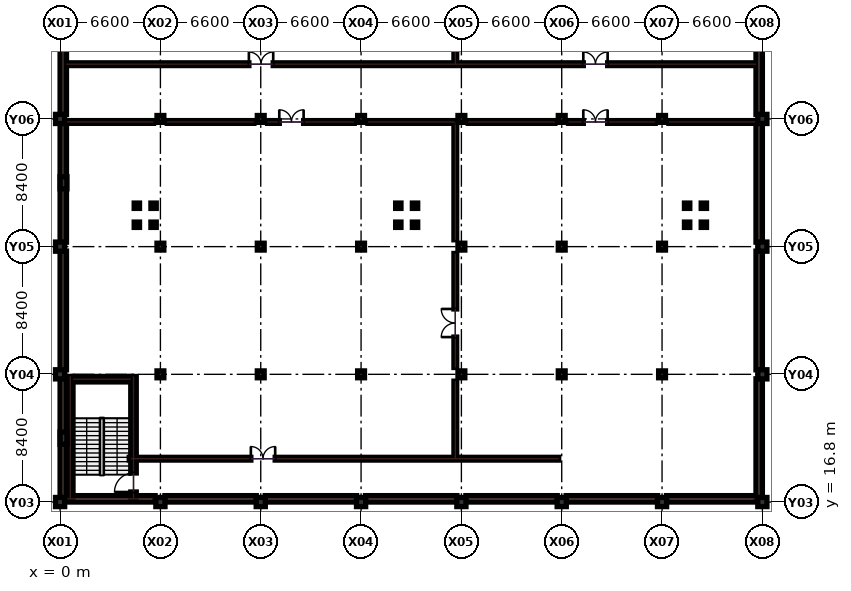
"""IFC4 building model, lengths in metres.
Left out: names, types, materials, properties, quantities, classifications, styles, units other than length and angle.
Written with IfcOpenShell. Run it as: python <this file> out.ifc"""

import sys

from ifc_helpers import new_model, si_unit, direction, frame, frame_2d, origin, origin_2d, place, context, subcontext, project, spatial, rectangle, extrude, element, fill, save


model = new_model("IFC4")
c1 = context("Model", 3, precision=1e-05, world=origin(), true_north=direction((0.0, 1.0)))
c2 = subcontext(c1, "Body", "Model", "MODEL_VIEW")
j1 = project(units=[si_unit("LENGTHUNIT", "METRE"), si_unit("PLANEANGLEUNIT", "RADIAN")], contexts=[c1])
p1 = place(None, origin())
s1 = spatial("IfcSite", under=j1, at=p1, CompositionType="ELEMENT")
p2 = place(p1, origin())
s2 = spatial("IfcBuilding", under=s1, at=p2, CompositionType="ELEMENT")
p3 = place(p2, frame((0.0, 0.0, -4.5)))
s3 = spatial("IfcBuildingStorey", under=s2, at=p3, CompositionType="ELEMENT", Elevation=-4.5)
for number, where, z_axis, x_axis in (
    (1, (0.0, 16.8, 0.0), (0.0, 0.0, 1.0), (1.0, 0.0, 0.0)),
    (2, (0.0, 25.2, 0.0), (0.0, 0.0, 1.0), (1.0, 0.0, 0.0)),
    (3, (0.0, 33.6, 0.0), (0.0, 0.0, 1.0), (1.0, 0.0, 0.0)),
    (4, (0.0, 42.0, 0.0), (0.0, 0.0, 1.0), (1.0, 0.0, 0.0)),
    (5, (6.6, 16.8, 0.0), (0.0, 0.0, 1.0), (1.0, 0.0, 0.0)),
):
    element("IfcColumn", number, at=place(p3, frame(where, z_axis=z_axis, x_axis=x_axis)), inside=s3, PredefinedType="COLUMN", context=c2, shape_type="SweptSolid", body=[
        extrude(rectangle(XDim=0.6, YDim=0.6, at=origin_2d()), origin(), (0.0, 0.0, 1.0), 4.5),
    ])
for number, where, z_axis, x_axis in (
    (6, (6.6, 25.2, 0.0), (0.0, 0.0, 1.0), (1.0, 0.0, 0.0)),
    (7, (6.6, 33.6, 0.0), (0.0, 0.0, 1.0), (1.0, 0.0, 0.0)),
    (8, (6.6, 42.0, 0.0), (0.0, 0.0, 1.0), (1.0, 0.0, 0.0)),
):
    element("IfcColumn", number, at=place(p3, frame(where, z_axis=z_axis, x_axis=x_axis)), inside=s3, PredefinedType="COLUMN", context=c2, shape_type="SweptSolid", body=[
        extrude(rectangle(XDim=0.45, YDim=0.45, at=origin_2d()), origin(), (0.0, 0.0, 1.0), 4.5),
    ])
p4 = place(p3, frame((13.2, 16.8, 0.0), z_axis=(0.0, 0.0, 1.0), x_axis=(1.0, 0.0, 0.0)))
e9 = element("IfcColumn", 9, at=p4, inside=s3, PredefinedType="COLUMN", context=c2, shape_type="SweptSolid", body=[
    extrude(rectangle(XDim=0.6, YDim=0.6, at=origin_2d()), origin(), (0.0, 0.0, 1.0), 4.5),
])
for number, where, z_axis, x_axis in (
    (10, (13.2, 25.2, 0.0), (0.0, 0.0, 1.0), (1.0, 0.0, 0.0)),
    (11, (13.2, 33.6, 0.0), (0.0, 0.0, 1.0), (1.0, 0.0, 0.0)),
    (12, (13.2, 42.0, 0.0), (0.0, 0.0, 1.0), (1.0, 0.0, 0.0)),
):
    element("IfcColumn", number, at=place(p3, frame(where, z_axis=z_axis, x_axis=x_axis)), inside=s3, PredefinedType="COLUMN", context=c2, shape_type="SweptSolid", body=[
        extrude(rectangle(XDim=0.45, YDim=0.45, at=origin_2d()), origin(), (0.0, 0.0, 1.0), 4.5),
    ])
p5 = place(p3, frame((19.8, 16.8, 0.0), z_axis=(0.0, 0.0, 1.0), x_axis=(1.0, 0.0, 0.0)))
e13 = element("IfcColumn", 13, at=p5, inside=s3, PredefinedType="COLUMN", context=c2, shape_type="SweptSolid", body=[
    extrude(rectangle(XDim=0.6, YDim=0.6, at=origin_2d()), origin(), (0.0, 0.0, 1.0), 4.5),
])
for number, where, z_axis, x_axis in (
    (14, (19.8, 25.2, 0.0), (0.0, 0.0, 1.0), (1.0, 0.0, 0.0)),
    (15, (19.8, 33.6, 0.0), (0.0, 0.0, 1.0), (1.0, 0.0, 0.0)),
    (16, (19.8, 42.0, 0.0), (0.0, 0.0, 1.0), (1.0, 0.0, 0.0)),
):
    element("IfcColumn", number, at=place(p3, frame(where, z_axis=z_axis, x_axis=x_axis)), inside=s3, PredefinedType="COLUMN", context=c2, shape_type="SweptSolid", body=[
        extrude(rectangle(XDim=0.45, YDim=0.45, at=origin_2d()), origin(), (0.0, 0.0, 1.0), 4.5),
    ])
p6 = place(p3, frame((26.4, 16.8, 0.0), z_axis=(0.0, 0.0, 1.0), x_axis=(1.0, 0.0, 0.0)))
e17 = element("IfcColumn", 17, at=p6, inside=s3, PredefinedType="COLUMN", context=c2, shape_type="SweptSolid", body=[
    extrude(rectangle(XDim=0.6, YDim=0.6, at=origin_2d()), origin(), (0.0, 0.0, 1.0), 4.5),
])
for number, where, z_axis, x_axis in (
    (18, (26.4, 25.2, 0.0), (0.0, 0.0, 1.0), (1.0, 0.0, 0.0)),
    (19, (26.4, 33.6, 0.0), (0.0, 0.0, 1.0), (1.0, 0.0, 0.0)),
    (20, (26.4, 42.0, 0.0), (0.0, 0.0, 1.0), (1.0, 0.0, 0.0)),
):
    element("IfcColumn", number, at=place(p3, frame(where, z_axis=z_axis, x_axis=x_axis)), inside=s3, PredefinedType="COLUMN", context=c2, shape_type="SweptSolid", body=[
        extrude(rectangle(XDim=0.45, YDim=0.45, at=origin_2d()), origin(), (0.0, 0.0, 1.0), 4.5),
    ])
p7 = place(p3, frame((33.0, 16.8, 0.0), z_axis=(0.0, 0.0, 1.0), x_axis=(1.0, 0.0, 0.0)))
e21 = element("IfcColumn", 21, at=p7, inside=s3, PredefinedType="COLUMN", context=c2, shape_type="SweptSolid", body=[
    extrude(rectangle(XDim=0.6, YDim=0.6, at=origin_2d()), origin(), (0.0, 0.0, 1.0), 4.5),
])
for number, where, z_axis, x_axis in (
    (22, (33.0, 25.2, 0.0), (0.0, 0.0, 1.0), (1.0, 0.0, 0.0)),
    (23, (33.0, 33.6, 0.0), (0.0, 0.0, 1.0), (1.0, 0.0, 0.0)),
    (24, (33.0, 42.0, 0.0), (0.0, 0.0, 1.0), (1.0, 0.0, 0.0)),
):
    element("IfcColumn", number, at=place(p3, frame(where, z_axis=z_axis, x_axis=x_axis)), inside=s3, PredefinedType="COLUMN", context=c2, shape_type="SweptSolid", body=[
        extrude(rectangle(XDim=0.45, YDim=0.45, at=origin_2d()), origin(), (0.0, 0.0, 1.0), 4.5),
    ])
p8 = place(p3, frame((39.6, 16.8, 0.0), z_axis=(0.0, 0.0, 1.0), x_axis=(1.0, 0.0, 0.0)))
e25 = element("IfcColumn", 25, at=p8, inside=s3, PredefinedType="COLUMN", context=c2, shape_type="SweptSolid", body=[
    extrude(rectangle(XDim=0.6, YDim=0.6, at=origin_2d()), origin(), (0.0, 0.0, 1.0), 4.5),
])
for number, where, z_axis, x_axis in (
    (26, (39.6, 25.2, 0.0), (0.0, 0.0, 1.0), (1.0, 0.0, 0.0)),
    (27, (39.6, 33.6, 0.0), (0.0, 0.0, 1.0), (1.0, 0.0, 0.0)),
    (28, (39.6, 42.0, 0.0), (0.0, 0.0, 1.0), (1.0, 0.0, 0.0)),
):
    element("IfcColumn", number, at=place(p3, frame(where, z_axis=z_axis, x_axis=x_axis)), inside=s3, PredefinedType="COLUMN", context=c2, shape_type="SweptSolid", body=[
        extrude(rectangle(XDim=0.45, YDim=0.45, at=origin_2d()), origin(), (0.0, 0.0, 1.0), 4.5),
    ])
for number, where, z_axis, x_axis in (
    (29, (46.2, 16.8, 0.0), (0.0, 0.0, 1.0), (1.0, 0.0, 0.0)),
    (30, (46.2, 25.2, 0.0), (0.0, 0.0, 1.0), (1.0, 0.0, 0.0)),
    (31, (46.2, 33.6, 0.0), (0.0, 0.0, 1.0), (1.0, 0.0, 0.0)),
    (32, (46.2, 42.0, 0.0), (0.0, 0.0, 1.0), (1.0, 0.0, 0.0)),
):
    element("IfcColumn", number, at=place(p3, frame(where, z_axis=z_axis, x_axis=x_axis)), inside=s3, PredefinedType="COLUMN", context=c2, shape_type="SweptSolid", body=[
        extrude(rectangle(XDim=0.6, YDim=0.6, at=origin_2d()), origin(), (0.0, 0.0, 1.0), 4.5),
    ])
for number, where, z_axis, x_axis in (
    (33, (0.225, 21.0, 0.0), (0.0, 0.0, 1.0), (1.0, 0.0, 0.0)),
    (34, (0.225, 37.8, 0.0), (0.0, 0.0, 1.0), (1.0, 0.0, 0.0)),
):
    element("IfcColumn", number, at=place(p3, frame(where, z_axis=z_axis, x_axis=x_axis)), inside=s3, PredefinedType="PILASTER", context=c2, shape_type="SweptSolid", body=[
        extrude(rectangle(XDim=0.45, YDim=0.8, at=origin_2d()), origin(), (0.0, 0.0, 1.0), 4.5),
    ])
p9 = place(p3, frame((4.55, 19.65, 0.0), z_axis=(0.0, 0.0, 1.0), x_axis=(1.0, 0.0, 0.0)))
e35 = element("IfcWall", 35, at=p9, inside=s3, PredefinedType="SOLIDWALL", context=c2, shape_type="SweptSolid", body=[
    extrude(rectangle(XDim=28.25, YDim=0.18, at=frame_2d((14.125, 0.0))), origin(), (0.0, 0.0, 1.0), 3.29),
])
p10 = place(p9, frame((8.0, 0.0, 0.0)))
e36 = element("IfcOpeningElement", 36, at=p10, cuts=e35, PredefinedType="OPENING", context=c2, shape_type="SweptSolid", body=[
    extrude(rectangle(XDim=1.6, YDim=2.2, at=frame_2d((0.8, 1.1))), frame((0.0, 0.1, 0.0), z_axis=(0.0, -1.0, 0.0), x_axis=(1.0, 0.0, 0.0)), (0.0, 0.0, 1.0), 0.2),
])
p11 = place(p3, frame((0.42, 41.8, 0.0), z_axis=(0.0, 0.0, 1.0), x_axis=(1.0, 0.0, 0.0)))
e37 = element("IfcWall", 37, at=p11, inside=s3, PredefinedType="SOLIDWALL", context=c2, shape_type="SweptSolid", body=[
    extrude(rectangle(XDim=5.73, YDim=0.18, at=frame_2d((2.865, 0.0))), origin(), (0.0, 0.0, 1.0), 3.275),
])
p12 = place(p3, frame((7.05, 41.8, 0.0), z_axis=(0.0, 0.0, 1.0), x_axis=(1.0, 0.0, 0.0)))
e38 = element("IfcWall", 38, at=p12, inside=s3, PredefinedType="SOLIDWALL", context=c2, shape_type="SweptSolid", body=[
    extrude(rectangle(XDim=5.7, YDim=0.18, at=frame_2d((2.85, 0.0))), origin(), (0.0, 0.0, 1.0), 3.275),
])
p13 = place(p3, frame((13.65, 41.8, 0.0), z_axis=(0.0, 0.0, 1.0), x_axis=(1.0, 0.0, 0.0)))
e39 = element("IfcWall", 39, at=p13, inside=s3, PredefinedType="SOLIDWALL", context=c2, shape_type="SweptSolid", body=[
    extrude(rectangle(XDim=5.7, YDim=0.18, at=frame_2d((2.85, 0.0))), origin(), (0.0, 0.0, 1.0), 3.275),
])
p14 = place(p13, frame((0.77, 0.0, 0.0)))
e40 = element("IfcOpeningElement", 40, at=p14, cuts=e39, PredefinedType="OPENING", context=c2, shape_type="SweptSolid", body=[
    extrude(rectangle(XDim=1.6, YDim=2.2, at=frame_2d((0.8, 1.1))), frame((0.0, 0.1, 0.0), z_axis=(0.0, -1.0, 0.0), x_axis=(1.0, 0.0, 0.0)), (0.0, 0.0, 1.0), 0.2),
])
for number, where, z_axis, x_axis in (
    (41, (20.25, 41.8, 0.0), (0.0, 0.0, 1.0), (1.0, 0.0, 0.0)),
    (42, (26.85, 41.8, 0.0), (0.0, 0.0, 1.0), (1.0, 0.0, 0.0)),
):
    element("IfcWall", number, at=place(p3, frame(where, z_axis=z_axis, x_axis=x_axis)), inside=s3, PredefinedType="SOLIDWALL", context=c2, shape_type="SweptSolid", body=[
        extrude(rectangle(XDim=5.7, YDim=0.18, at=frame_2d((2.85, 0.0))), origin(), (0.0, 0.0, 1.0), 3.275),
    ])
p15 = place(p3, frame((33.45, 41.8, 0.0), z_axis=(0.0, 0.0, 1.0), x_axis=(1.0, 0.0, 0.0)))
e43 = element("IfcWall", 43, at=p15, inside=s3, PredefinedType="SOLIDWALL", context=c2, shape_type="SweptSolid", body=[
    extrude(rectangle(XDim=5.7, YDim=0.18, at=frame_2d((2.85, 0.0))), origin(), (0.0, 0.0, 1.0), 3.275),
])
p16 = place(p15, frame((0.97, 0.0, 0.0)))
e44 = element("IfcOpeningElement", 44, at=p16, cuts=e43, PredefinedType="OPENING", context=c2, shape_type="SweptSolid", body=[
    extrude(rectangle(XDim=1.6, YDim=2.2, at=frame_2d((0.8, 1.1))), frame((0.0, 0.1, 0.0), z_axis=(0.0, -1.0, 0.0), x_axis=(1.0, 0.0, 0.0)), (0.0, 0.0, 1.0), 0.2),
])
p17 = place(p3, frame((40.05, 41.8, 0.0), z_axis=(0.0, 0.0, 1.0), x_axis=(1.0, 0.0, 0.0)))
e45 = element("IfcWall", 45, at=p17, inside=s3, PredefinedType="SOLIDWALL", context=c2, shape_type="SweptSolid", body=[
    extrude(rectangle(XDim=5.73, YDim=0.18, at=frame_2d((2.865, 0.0))), origin(), (0.0, 0.0, 1.0), 3.275),
])
p18 = place(p3, frame((26.0, 19.65, 0.0), z_axis=(0.0, 0.0, 1.0), x_axis=(0.0, 1.0, 0.0)))
e46 = element("IfcWall", 46, at=p18, inside=s3, PredefinedType="SOLIDWALL", context=c2, shape_type="SweptSolid", body=[
    extrude(rectangle(XDim=5.1, YDim=0.18, at=frame_2d((2.55, 0.0))), origin(), (0.0, 0.0, 1.0), 3.29),
])
p19 = place(p3, frame((26.0, 25.65, 0.0), z_axis=(0.0, 0.0, 1.0), x_axis=(0.0, 1.0, 0.0)))
e47 = element("IfcWall", 47, at=p19, inside=s3, PredefinedType="SOLIDWALL", context=c2, shape_type="SweptSolid", body=[
    extrude(rectangle(XDim=7.5, YDim=0.18, at=frame_2d((3.75, 0.0))), origin(), (0.0, 0.0, 1.0), 3.29),
])
p20 = place(p19, frame((2.0, 0.0, 0.0)))
e48 = element("IfcOpeningElement", 48, at=p20, cuts=e47, PredefinedType="OPENING", context=c2, shape_type="SweptSolid", body=[
    extrude(rectangle(XDim=1.85, YDim=2.25, at=frame_2d((0.925, 1.125))), frame((0.0, 0.1, 0.0), z_axis=(0.0, -1.0, 0.0), x_axis=(1.0, 0.0, 0.0)), (0.0, 0.0, 1.0), 0.2),
])
p21 = place(p3, frame((26.0, 34.05, 0.0), z_axis=(0.0, 0.0, 1.0), x_axis=(0.0, 1.0, 0.0)))
e49 = element("IfcWall", 49, at=p21, inside=s3, PredefinedType="SOLIDWALL", context=c2, shape_type="SweptSolid", body=[
    extrude(rectangle(XDim=7.75, YDim=0.18, at=frame_2d((3.875, 0.0))), origin(), (0.0, 0.0, 1.0), 3.29),
])
p22 = place(p3, frame((0.42, 45.6, 0.0), z_axis=(0.0, 0.0, 1.0), x_axis=(1.0, 0.0, 0.0)))
e50 = element("IfcWall", 50, at=p22, inside=s3, PredefinedType="SOLIDWALL", context=c2, shape_type="SweptSolid", body=[
    extrude(rectangle(XDim=45.36, YDim=0.18, at=frame_2d((22.68, 0.0))), origin(), (0.0, 0.0, 1.0), 3.29),
])
p23 = place(p22, frame((12.0, 0.0, 0.0)))
e51 = element("IfcOpeningElement", 51, at=p23, cuts=e50, PredefinedType="OPENING", context=c2, shape_type="SweptSolid", body=[
    extrude(rectangle(XDim=1.6, YDim=2.2, at=frame_2d((0.8, 1.1))), frame((0.0, 0.1, 0.0), z_axis=(0.0, -1.0, 0.0), x_axis=(1.0, 0.0, 0.0)), (0.0, 0.0, 1.0), 0.2),
])
p24 = place(p22, frame((34.0, 0.0, 0.0)))
e52 = element("IfcOpeningElement", 52, at=p24, cuts=e50, PredefinedType="OPENING", context=c2, shape_type="SweptSolid", body=[
    extrude(rectangle(XDim=1.6, YDim=2.2, at=frame_2d((0.8, 1.1))), frame((0.0, 0.1, 0.0), z_axis=(0.0, -1.0, 0.0), x_axis=(1.0, 0.0, 0.0)), (0.0, 0.0, 1.0), 0.2),
])
p25 = place(p3, frame((26.0, 45.6, 0.0), z_axis=(0.0, 0.0, 1.0), x_axis=(0.0, 1.0, 0.0)))
e53 = element("IfcWall", 53, at=p25, inside=s3, PredefinedType="SOLIDWALL", context=c2, shape_type="SweptSolid", body=[
    extrude(rectangle(XDim=4.35, YDim=0.18, at=frame_2d((2.175, 0.0))), origin(), (0.0, 0.0, 1.0), 3.29),
])
p26 = place(p3, frame((0.35, 17.01, 0.0), z_axis=(0.0, 0.0, 1.0), x_axis=(1.0, 0.0, 0.0)))
e54 = element("IfcWall", 54, at=p26, inside=s3, PredefinedType="SOLIDWALL", context=c2, shape_type="SweptSolid", body=[
    extrude(rectangle(XDim=5.9, YDim=0.42, at=frame_2d((2.95, 0.0))), origin(), (0.0, 0.0, 1.0), 4.14),
])
p27 = place(p3, frame((0.21, 24.905, 0.0), z_axis=(0.0, 0.0, 1.0), x_axis=(0.0, -1.0, 0.0)))
e55 = element("IfcWall", 55, at=p27, inside=s3, PredefinedType="SOLIDWALL", context=c2, shape_type="SweptSolid", body=[
    extrude(rectangle(XDim=7.81, YDim=0.42, at=frame_2d((3.905, 0.0))), origin(), (0.0, 0.0, 1.0), 4.14),
])
p28 = place(p3, frame((0.21, 33.305, 0.0), z_axis=(0.0, 0.0, 1.0), x_axis=(0.0, -1.0, 0.0)))
e56 = element("IfcWall", 56, at=p28, inside=s3, PredefinedType="SOLIDWALL", context=c2, shape_type="SweptSolid", body=[
    extrude(rectangle(XDim=7.81, YDim=0.42, at=frame_2d((3.905, 0.0))), origin(), (0.0, 0.0, 1.0), 4.14),
])
for number, where, z_axis, x_axis in (
    (57, (0.21, 41.705, 0.0), (0.0, 0.0, 1.0), (0.0, -1.0, 0.0)),
    (58, (0.21, 50.105, 0.0), (0.0, 0.0, 1.0), (0.0, -1.0, 0.0)),
):
    element("IfcWall", number, at=place(p3, frame(where, z_axis=z_axis, x_axis=x_axis)), inside=s3, PredefinedType="SOLIDWALL", context=c2, shape_type="SweptSolid", body=[
        extrude(rectangle(XDim=7.81, YDim=0.42, at=frame_2d((3.905, 0.0))), origin(), (0.0, 0.0, 1.0), 4.14),
    ])
p29 = place(p3, frame((6.895, 17.01, 0.0), z_axis=(0.0, 0.0, 1.0), x_axis=(1.0, 0.0, 0.0)))
e59 = element("IfcWall", 59, at=p29, inside=s3, PredefinedType="SOLIDWALL", context=c2, shape_type="SweptSolid", body=[
    extrude(rectangle(XDim=6.01, YDim=0.42, at=frame_2d((3.005, 0.0))), origin(), (0.0, 0.0, 1.0), 4.14),
])
p30 = place(p3, frame((13.495, 17.01, 0.0), z_axis=(0.0, 0.0, 1.0), x_axis=(1.0, 0.0, 0.0)))
e60 = element("IfcWall", 60, at=p30, inside=s3, PredefinedType="SOLIDWALL", context=c2, shape_type="SweptSolid", body=[
    extrude(rectangle(XDim=6.01, YDim=0.42, at=frame_2d((3.005, 0.0))), origin(), (0.0, 0.0, 1.0), 4.14),
])
for number, where, z_axis, x_axis in (
    (61, (20.095, 17.01, 0.0), (0.0, 0.0, 1.0), (1.0, 0.0, 0.0)),
    (62, (26.695, 17.01, 0.0), (0.0, 0.0, 1.0), (1.0, 0.0, 0.0)),
    (63, (33.295, 17.01, 0.0), (0.0, 0.0, 1.0), (1.0, 0.0, 0.0)),
    (64, (39.895, 17.01, 0.0), (0.0, 0.0, 1.0), (1.0, 0.0, 0.0)),
):
    element("IfcWall", number, at=place(p3, frame(where, z_axis=z_axis, x_axis=x_axis)), inside=s3, PredefinedType="SOLIDWALL", context=c2, shape_type="SweptSolid", body=[
        extrude(rectangle(XDim=6.01, YDim=0.42, at=frame_2d((3.005, 0.0))), origin(), (0.0, 0.0, 1.0), 4.14),
    ])
p31 = place(p3, frame((45.99, 17.095, 0.0), z_axis=(0.0, 0.0, 1.0), x_axis=(0.0, 1.0, 0.0)))
e65 = element("IfcWall", 65, at=p31, inside=s3, PredefinedType="SOLIDWALL", context=c2, shape_type="SweptSolid", body=[
    extrude(rectangle(XDim=7.81, YDim=0.42, at=frame_2d((3.905, 0.0))), origin(), (0.0, 0.0, 1.0), 4.14),
])
p32 = place(p3, frame((45.99, 25.495, 0.0), z_axis=(0.0, 0.0, 1.0), x_axis=(0.0, 1.0, 0.0)))
e66 = element("IfcWall", 66, at=p32, inside=s3, PredefinedType="SOLIDWALL", context=c2, shape_type="SweptSolid", body=[
    extrude(rectangle(XDim=7.81, YDim=0.42, at=frame_2d((3.905, 0.0))), origin(), (0.0, 0.0, 1.0), 4.14),
])
for number, where, z_axis, x_axis in (
    (67, (45.99, 33.895, 0.0), (0.0, 0.0, 1.0), (0.0, 1.0, 0.0)),
    (68, (45.99, 42.295, 0.0), (0.0, 0.0, 1.0), (0.0, 1.0, 0.0)),
):
    element("IfcWall", number, at=place(p3, frame(where, z_axis=z_axis, x_axis=x_axis)), inside=s3, PredefinedType="SOLIDWALL", context=c2, shape_type="SweptSolid", body=[
        extrude(rectangle(XDim=7.81, YDim=0.42, at=frame_2d((3.905, 0.0))), origin(), (0.0, 0.0, 1.0), 4.14),
    ])
p33 = place(p3, frame((0.67, 17.01, 0.0), z_axis=(0.0, 0.0, 1.0), x_axis=(0.0, 1.0, 0.0)))
e69 = element("IfcWall", 69, at=p33, inside=s3, PredefinedType="SHEAR", context=c2, shape_type="SweptSolid", body=[
    extrude(rectangle(XDim=8.05, YDim=0.36, at=frame_2d((4.025, 0.0))), origin(), (0.0, 0.0, 1.0), 4.14),
])
p34 = place(p3, frame((4.83, 17.01, 0.0), z_axis=(0.0, 0.0, 1.0), x_axis=(0.0, 1.0, 0.0)))
e70 = element("IfcWall", 70, at=p34, inside=s3, PredefinedType="SHEAR", context=c2, shape_type="SweptSolid", body=[
    extrude(rectangle(XDim=8.05, YDim=0.36, at=frame_2d((4.025, 0.0))), origin(), (0.0, 0.0, 1.0), 4.14),
])
p35 = place(p34, frame((0.45, 0.0, 0.0)))
e71 = element("IfcOpeningElement", 71, at=p35, cuts=e70, PredefinedType="OPENING", context=c2, shape_type="SweptSolid", body=[
    extrude(rectangle(XDim=1.25, YDim=2.15, at=frame_2d((0.625, 1.075))), frame((0.0, 0.19, 0.0), z_axis=(0.0, -1.0, 0.0), x_axis=(1.0, 0.0, 0.0)), (0.0, 0.0, 1.0), 0.38),
])
p36 = place(p3, frame((0.85, 24.88, 0.0), z_axis=(0.0, 0.0, 1.0), x_axis=(1.0, 0.0, 0.0)))
e72 = element("IfcWall", 72, at=p36, inside=s3, PredefinedType="SHEAR", context=c2, shape_type="SweptSolid", body=[
    extrude(rectangle(XDim=3.8, YDim=0.36, at=frame_2d((1.9, 0.0))), origin(), (0.0, 0.0, 1.0), 4.14),
])
for number, where, z_axis, x_axis in (
    (73, (22.25, 35.04, 0.0), (0.0, 0.0, 1.0), (1.0, 0.0, 0.0)),
    (74, (23.35, 35.04, 0.0), (0.0, 0.0, 1.0), (1.0, 0.0, 0.0)),
    (75, (23.35, 36.29, 0.0), (0.0, 0.0, 1.0), (1.0, 0.0, 0.0)),
    (76, (22.25, 36.29, 0.0), (0.0, 0.0, 1.0), (1.0, 0.0, 0.0)),
    (77, (41.25, 35.04, 0.0), (0.0, 0.0, 1.0), (1.0, 0.0, 0.0)),
    (78, (42.35, 35.04, 0.0), (0.0, 0.0, 1.0), (1.0, 0.0, 0.0)),
    (79, (42.35, 36.29, 0.0), (0.0, 0.0, 1.0), (1.0, 0.0, 0.0)),
    (80, (41.25, 36.29, 0.0), (0.0, 0.0, 1.0), (1.0, 0.0, 0.0)),
    (81, (5.05, 35.04, 0.0), (0.0, 0.0, 1.0), (1.0, 0.0, 0.0)),
    (82, (6.15, 35.04, 0.0), (0.0, 0.0, 1.0), (1.0, 0.0, 0.0)),
    (83, (6.15, 36.29, 0.0), (0.0, 0.0, 1.0), (1.0, 0.0, 0.0)),
    (84, (5.05, 36.29, 0.0), (0.0, 0.0, 1.0), (1.0, 0.0, 0.0)),
):
    element("IfcColumn", number, at=place(p3, frame(where, z_axis=z_axis, x_axis=x_axis)), inside=s3, PredefinedType="COLUMN", context=c2, shape_type="SweptSolid", body=[
        extrude(rectangle(XDim=0.35, YDim=0.35, at=origin_2d()), origin(), (0.0, 0.0, 1.0), 4.5),
    ])
p37 = place(p10, origin())
e85 = element("IfcDoor", 85, at=p37, inside=s3, OperationType="DOUBLE_DOOR_SINGLE_SWING", PredefinedType="DOOR", context=c2, shape_type="SweptSolid", body=[
    extrude(rectangle(XDim=1.6, YDim=2.2, at=frame_2d((0.8, 1.1))), frame((0.0, 0.025, 0.0), z_axis=(0.0, -1.0, 0.0), x_axis=(1.0, 0.0, 0.0)), (0.0, 0.0, 1.0), 0.05),
])
fill(e36, e85)
p38 = place(p14, origin())
e86 = element("IfcDoor", 86, at=p38, inside=s3, OperationType="DOUBLE_DOOR_SINGLE_SWING", PredefinedType="DOOR", context=c2, shape_type="SweptSolid", body=[
    extrude(rectangle(XDim=1.6, YDim=2.2, at=frame_2d((0.8, 1.1))), frame((0.0, 0.025, 0.0), z_axis=(0.0, -1.0, 0.0), x_axis=(1.0, 0.0, 0.0)), (0.0, 0.0, 1.0), 0.05),
])
fill(e40, e86)
p39 = place(p16, origin())
e87 = element("IfcDoor", 87, at=p39, inside=s3, OperationType="DOUBLE_DOOR_SINGLE_SWING", PredefinedType="DOOR", context=c2, shape_type="SweptSolid", body=[
    extrude(rectangle(XDim=1.6, YDim=2.2, at=frame_2d((0.8, 1.1))), frame((0.0, 0.025, 0.0), z_axis=(0.0, -1.0, 0.0), x_axis=(1.0, 0.0, 0.0)), (0.0, 0.0, 1.0), 0.05),
])
fill(e44, e87)
p40 = place(p20, origin())
e88 = element("IfcDoor", 88, at=p40, inside=s3, OperationType="DOUBLE_DOOR_SINGLE_SWING", PredefinedType="DOOR", context=c2, shape_type="SweptSolid", body=[
    extrude(rectangle(XDim=1.85, YDim=2.25, at=frame_2d((0.925, 1.125))), frame((0.0, 0.025, 0.0), z_axis=(0.0, -1.0, 0.0), x_axis=(1.0, 0.0, 0.0)), (0.0, 0.0, 1.0), 0.05),
])
fill(e48, e88)
p41 = place(p23, origin())
e89 = element("IfcDoor", 89, at=p41, inside=s3, OperationType="DOUBLE_DOOR_SINGLE_SWING", PredefinedType="DOOR", context=c2, shape_type="SweptSolid", body=[
    extrude(rectangle(XDim=1.6, YDim=2.2, at=frame_2d((0.8, 1.1))), frame((0.0, 0.025, 0.0), z_axis=(0.0, -1.0, 0.0), x_axis=(1.0, 0.0, 0.0)), (0.0, 0.0, 1.0), 0.05),
])
fill(e51, e89)
p42 = place(p24, origin())
e90 = element("IfcDoor", 90, at=p42, inside=s3, OperationType="DOUBLE_DOOR_SINGLE_SWING", PredefinedType="DOOR", context=c2, shape_type="SweptSolid", body=[
    extrude(rectangle(XDim=1.6, YDim=2.2, at=frame_2d((0.8, 1.1))), frame((0.0, 0.025, 0.0), z_axis=(0.0, -1.0, 0.0), x_axis=(1.0, 0.0, 0.0)), (0.0, 0.0, 1.0), 0.05),
])
fill(e52, e90)
p43 = place(p35, origin())
e91 = element("IfcDoor", 91, at=p43, inside=s3, OperationType="SINGLE_SWING_LEFT", PredefinedType="DOOR", context=c2, shape_type="SweptSolid", body=[
    extrude(rectangle(XDim=1.25, YDim=2.15, at=frame_2d((0.625, 1.075))), frame((0.0, 0.025, 0.0), z_axis=(0.0, -1.0, 0.0), x_axis=(1.0, 0.0, 0.0)), (0.0, 0.0, 1.0), 0.05),
])
fill(e71, e91)
save(model, sys.argv[1])
